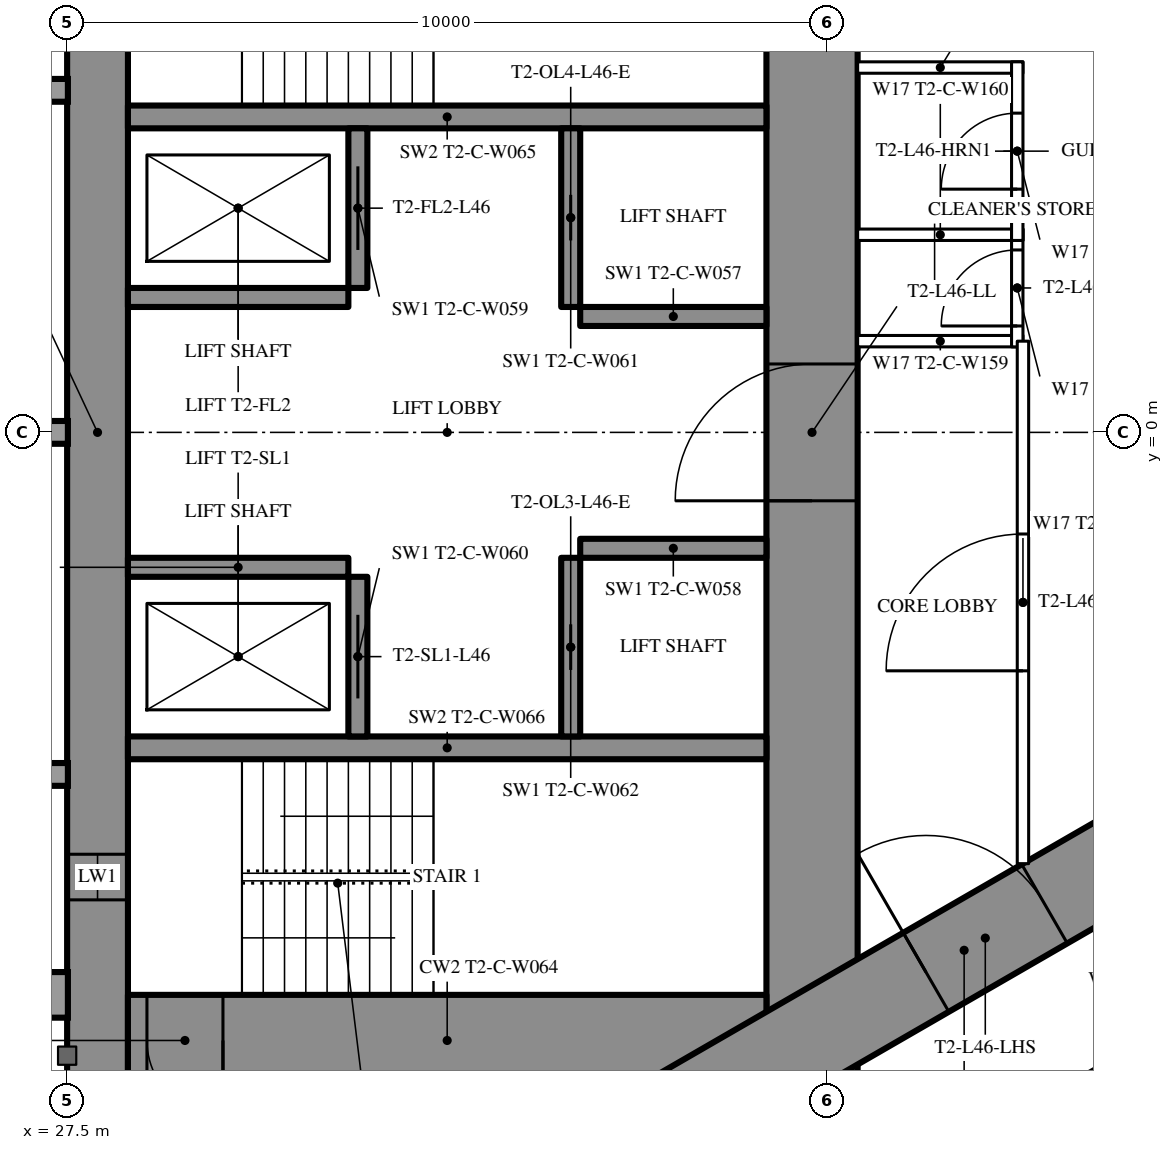
"""IFC4 building model, lengths in metres.
Left out: names, types, materials, properties, quantities, classifications, styles, units other than length and angle.
Written with IfcOpenShell. Run it as: python <this file> out.ifc"""

import sys

from ifc_helpers import new_model, si_unit, direction, frame, frame_2d, origin, place, context, subcontext, project, spatial, rectangle, extrude, element, fill, save


model = new_model("IFC4")
c1 = context("Model", 3, precision=1e-05, world=origin(), true_north=direction((0.0, 1.0)))
c2 = subcontext(c1, "Body", "Model", "MODEL_VIEW")
j1 = project(units=[si_unit("LENGTHUNIT", "METRE"), si_unit("PLANEANGLEUNIT", "RADIAN")], contexts=[c1])
p1 = place(None, origin())
s1 = spatial("IfcSite", under=j1, at=p1, CompositionType="ELEMENT")
p2 = place(p1, origin())
s2 = spatial("IfcBuilding", under=s1, at=p2, CompositionType="ELEMENT")
p3 = place(p2, frame((0.0, 0.0, 173.8)))
s3 = spatial("IfcBuildingStorey", under=s2, at=p3, CompositionType="ELEMENT", Elevation=173.8)
p4 = place(p3, frame((27.9, -8.6, 0.0), z_axis=(0.0, 0.0, 1.0), x_axis=(0.0, 1.0, 0.0)))
e1 = element("IfcWall", 1, at=p4, inside=s3, PredefinedType="SHEAR", context=c2, shape_type="SweptSolid", body=[
    extrude(rectangle(XDim=17.2, YDim=0.8, at=frame_2d((8.6, 0.0))), origin(), (0.0, 0.0, 1.0), 3.5),
])
p5 = place(p4, frame((2.45, 0.0, 0.6)))
e2 = element("IfcOpeningElement", 2, at=p5, cuts=e1, PredefinedType="OPENING", context=c2, shape_type="SweptSolid", body=[
    extrude(rectangle(XDim=0.6, YDim=2.1, at=frame_2d((0.3, 1.05))), frame((0.0, 0.41, 0.0), z_axis=(0.0, -1.0, 0.0), x_axis=(1.0, 0.0, 0.0)), (0.0, 0.0, 1.0), 0.82),
])
p6 = place(p4, frame((14.15, 0.0, 0.6)))
e3 = element("IfcOpeningElement", 3, at=p6, cuts=e1, PredefinedType="OPENING", context=c2, shape_type="SweptSolid", body=[
    extrude(rectangle(XDim=0.6, YDim=2.1, at=frame_2d((0.3, 1.05))), frame((0.0, 0.41, 0.0), z_axis=(0.0, -1.0, 0.0), x_axis=(1.0, 0.0, 0.0)), (0.0, 0.0, 1.0), 0.82),
])
p7 = place(p3, frame((37.3, -8.6, 0.0), z_axis=(0.0, 0.0, 1.0), x_axis=(0.0, 1.0, 0.0)))
e4 = element("IfcWall", 4, at=p7, inside=s3, PredefinedType="SHEAR", context=c2, shape_type="SweptSolid", body=[
    extrude(rectangle(XDim=17.2, YDim=1.2, at=frame_2d((8.6, 0.0))), origin(), (0.0, 0.0, 1.0), 3.5),
])
p8 = place(p7, frame((7.7, 0.0, 0.0)))
e5 = element("IfcOpeningElement", 5, at=p8, cuts=e4, PredefinedType="OPENING", context=c2, shape_type="SweptSolid", body=[
    extrude(rectangle(XDim=1.8, YDim=2.2, at=frame_2d((0.9, 1.1))), frame((0.0, 0.61, 0.0), z_axis=(0.0, -1.0, 0.0), x_axis=(1.0, 0.0, 0.0)), (0.0, 0.0, 1.0), 1.22),
])
p9 = place(p3, frame((28.3, -8.0, 0.0), z_axis=(0.0, 0.0, 1.0), x_axis=(1.0, 0.0, 0.0)))
e6 = element("IfcWall", 6, at=p9, inside=s3, PredefinedType="SHEAR", context=c2, shape_type="SweptSolid", body=[
    extrude(rectangle(XDim=8.4, YDim=1.2, at=frame_2d((4.2, 0.0))), origin(), (0.0, 0.0, 1.0), 3.5),
])
p10 = place(p9, frame((0.25, 0.0, 0.0)))
e7 = element("IfcOpeningElement", 7, at=p10, cuts=e6, PredefinedType="OPENING", context=c2, shape_type="SweptSolid", body=[
    extrude(rectangle(XDim=1.0, YDim=2.2, at=frame_2d((0.5, 1.1))), frame((0.0, 0.61, 0.0), z_axis=(0.0, -1.0, 0.0), x_axis=(1.0, 0.0, 0.0)), (0.0, 0.0, 1.0), 1.22),
])
for number, where, z_axis, x_axis in (
    (8, (28.3, -4.15, 0.0), (0.0, 0.0, 1.0), (1.0, 0.0, 0.0)),
    (9, (28.3, 4.15, 0.0), (0.0, 0.0, 1.0), (1.0, 0.0, 0.0)),
):
    element("IfcWall", number, at=place(p3, frame(where, z_axis=z_axis, x_axis=x_axis)), inside=s3, PredefinedType="SHEAR", context=c2, shape_type="SweptSolid", body=[
        extrude(rectangle(XDim=8.4, YDim=0.3, at=frame_2d((4.2, 0.0))), origin(), (0.0, 0.0, 1.0), 3.5),
    ])
p11 = place(p3, frame((31.325, -4.0, 0.0), z_axis=(0.0, 0.0, 1.0), x_axis=(0.0, 1.0, 0.0)))
e10 = element("IfcWall", 10, at=p11, inside=s3, PredefinedType="SHEAR", context=c2, shape_type="SweptSolid", body=[
    extrude(rectangle(XDim=2.1, YDim=0.25, at=frame_2d((1.05, 0.0))), origin(), (0.0, 0.0, 1.0), 3.5),
])
p12 = place(p11, frame((0.5, 0.0, 0.0)))
e11 = element("IfcOpeningElement", 11, at=p12, cuts=e10, PredefinedType="OPENING", context=c2, shape_type="SweptSolid", body=[
    extrude(rectangle(XDim=1.1, YDim=2.2, at=frame_2d((0.55, 1.1))), frame((0.0, 0.135, 0.0), z_axis=(0.0, -1.0, 0.0), x_axis=(1.0, 0.0, 0.0)), (0.0, 0.0, 1.0), 0.27),
])
p13 = place(p3, frame((34.125, -4.0, 0.0), z_axis=(0.0, 0.0, 1.0), x_axis=(0.0, 1.0, 0.0)))
e12 = element("IfcWall", 12, at=p13, inside=s3, PredefinedType="SHEAR", context=c2, shape_type="SweptSolid", body=[
    extrude(rectangle(XDim=2.35, YDim=0.25, at=frame_2d((1.175, 0.0))), origin(), (0.0, 0.0, 1.0), 3.5),
])
p14 = place(p13, frame((0.875, 0.0, 0.0)))
e13 = element("IfcOpeningElement", 13, at=p14, cuts=e12, PredefinedType="OPENING", context=c2, shape_type="SweptSolid", body=[
    extrude(rectangle(XDim=0.6, YDim=2.0, at=frame_2d((0.3, 1.0))), frame((0.0, 0.135, 0.0), z_axis=(0.0, -1.0, 0.0), x_axis=(1.0, 0.0, 0.0)), (0.0, 0.0, 1.0), 0.27),
])
p15 = place(p3, frame((28.3, -1.775, 0.0), z_axis=(0.0, 0.0, 1.0), x_axis=(1.0, 0.0, 0.0)))
e14 = element("IfcWall", 14, at=p15, inside=s3, PredefinedType="SHEAR", context=c2, shape_type="SweptSolid", body=[
    extrude(rectangle(XDim=2.9, YDim=0.25, at=frame_2d((1.45, 0.0))), origin(), (0.0, 0.0, 1.0), 3.5),
])
p16 = place(p3, frame((34.25, -1.525, 0.0), z_axis=(0.0, 0.0, 1.0), x_axis=(1.0, 0.0, 0.0)))
e15 = element("IfcWall", 15, at=p16, inside=s3, PredefinedType="SHEAR", context=c2, shape_type="SweptSolid", body=[
    extrude(rectangle(XDim=2.45, YDim=0.25, at=frame_2d((1.225, 0.0))), origin(), (0.0, 0.0, 1.0), 3.5),
])
p17 = place(p3, frame((31.325, 1.9, 0.0), z_axis=(0.0, 0.0, 1.0), x_axis=(0.0, 1.0, 0.0)))
e16 = element("IfcWall", 16, at=p17, inside=s3, PredefinedType="SHEAR", context=c2, shape_type="SweptSolid", body=[
    extrude(rectangle(XDim=2.1, YDim=0.25, at=frame_2d((1.05, 0.0))), origin(), (0.0, 0.0, 1.0), 3.5),
])
p18 = place(p17, frame((0.5, 0.0, 0.0)))
e17 = element("IfcOpeningElement", 17, at=p18, cuts=e16, PredefinedType="OPENING", context=c2, shape_type="SweptSolid", body=[
    extrude(rectangle(XDim=1.1, YDim=2.2, at=frame_2d((0.55, 1.1))), frame((0.0, 0.135, 0.0), z_axis=(0.0, -1.0, 0.0), x_axis=(1.0, 0.0, 0.0)), (0.0, 0.0, 1.0), 0.27),
])
p19 = place(p3, frame((34.125, 1.65, 0.0), z_axis=(0.0, 0.0, 1.0), x_axis=(0.0, 1.0, 0.0)))
e18 = element("IfcWall", 18, at=p19, inside=s3, PredefinedType="SHEAR", context=c2, shape_type="SweptSolid", body=[
    extrude(rectangle(XDim=2.35, YDim=0.25, at=frame_2d((1.175, 0.0))), origin(), (0.0, 0.0, 1.0), 3.5),
])
p20 = place(p19, frame((0.875, 0.0, 0.0)))
e19 = element("IfcOpeningElement", 19, at=p20, cuts=e18, PredefinedType="OPENING", context=c2, shape_type="SweptSolid", body=[
    extrude(rectangle(XDim=0.6, YDim=2.0, at=frame_2d((0.3, 1.0))), frame((0.0, 0.135, 0.0), z_axis=(0.0, -1.0, 0.0), x_axis=(1.0, 0.0, 0.0)), (0.0, 0.0, 1.0), 0.27),
])
p21 = place(p3, frame((28.3, 1.775, 0.0), z_axis=(0.0, 0.0, 1.0), x_axis=(1.0, 0.0, 0.0)))
e20 = element("IfcWall", 20, at=p21, inside=s3, PredefinedType="SHEAR", context=c2, shape_type="SweptSolid", body=[
    extrude(rectangle(XDim=2.9, YDim=0.25, at=frame_2d((1.45, 0.0))), origin(), (0.0, 0.0, 1.0), 3.5),
])
p22 = place(p3, frame((34.25, 1.525, 0.0), z_axis=(0.0, 0.0, 1.0), x_axis=(1.0, 0.0, 0.0)))
e21 = element("IfcWall", 21, at=p22, inside=s3, PredefinedType="SHEAR", context=c2, shape_type="SweptSolid", body=[
    extrude(rectangle(XDim=2.45, YDim=0.25, at=frame_2d((1.225, 0.0))), origin(), (0.0, 0.0, 1.0), 3.5),
])
p23 = place(p3, frame((27.2, -13.8, 0.0), z_axis=(0.0, 0.0, 1.0), x_axis=(0.866027159892, 0.499996958321, 0.0)))
e22 = element("IfcWall", 22, at=p23, inside=s3, PredefinedType="SHEAR", context=c2, shape_type="SweptSolid", body=[
    extrude(rectangle(XDim=27.947, YDim=1.2, at=frame_2d((13.973, 0.0))), origin(), (0.0, 0.0, 1.0), 3.5),
])
p24 = place(p23, frame((4.6, 0.0, 0.0)))
e23 = element("IfcOpeningElement", 23, at=p24, cuts=e22, PredefinedType="OPENING", context=c2, shape_type="SweptSolid", body=[
    extrude(rectangle(XDim=1.0, YDim=2.2, at=frame_2d((0.5, 1.1))), frame((0.0, 0.61, 0.0), z_axis=(0.0, -1.0, 0.0), x_axis=(1.0, 0.0, 0.0)), (0.0, 0.0, 1.0), 1.22),
])
p25 = place(p23, frame((13.395, 0.0, 0.0)))
e24 = element("IfcOpeningElement", 24, at=p25, cuts=e22, PredefinedType="OPENING", context=c2, shape_type="SweptSolid", body=[
    extrude(rectangle(XDim=1.8, YDim=2.2, at=frame_2d((0.9, 1.1))), frame((0.0, 0.61, 0.0), z_axis=(0.0, -1.0, 0.0), x_axis=(1.0, 0.0, 0.0)), (0.0, 0.0, 1.0), 1.22),
])
p26 = place(p3, frame((27.2, 13.8, 0.0), z_axis=(0.0, 0.0, 1.0), x_axis=(0.866024515034, -0.500001539357, 0.0)))
e25 = element("IfcWall", 25, at=p26, inside=s3, PredefinedType="SHEAR", context=c2, shape_type="SweptSolid", body=[
    extrude(rectangle(XDim=26.907, YDim=1.2, at=frame_2d((13.454, 0.0))), origin(), (0.0, 0.0, 1.0), 3.5),
])
p27 = place(p26, frame((4.6, 0.0, 0.0)))
e26 = element("IfcOpeningElement", 26, at=p27, cuts=e25, PredefinedType="OPENING", context=c2, shape_type="SweptSolid", body=[
    extrude(rectangle(XDim=1.0, YDim=2.2, at=frame_2d((0.5, 1.1))), frame((0.0, 0.61, 0.0), z_axis=(0.0, -1.0, 0.0), x_axis=(1.0, 0.0, 0.0)), (0.0, 0.0, 1.0), 1.22),
])
p28 = place(p26, frame((13.395, 0.0, 0.0)))
e27 = element("IfcOpeningElement", 27, at=p28, cuts=e25, PredefinedType="OPENING", context=c2, shape_type="SweptSolid", body=[
    extrude(rectangle(XDim=1.8, YDim=2.2, at=frame_2d((0.9, 1.1))), frame((0.0, 0.61, 0.0), z_axis=(0.0, -1.0, 0.0), x_axis=(1.0, 0.0, 0.0)), (0.0, 0.0, 1.0), 1.22),
])
p29 = place(p3, frame((27.959, -16.017, 0.0), z_axis=(0.0, 0.0, 1.0), x_axis=(0.866024151371, 0.500002169237, 0.0)))
e28 = element("IfcWall", 28, at=p29, inside=s3, PredefinedType="PARTITIONING", context=c2, shape_type="SweptSolid", body=[
    extrude(rectangle(XDim=32.034, YDim=0.2, at=frame_2d((16.017, 0.0))), origin(), (0.0, 0.0, 1.0), 3.25),
])
p30 = place(p29, frame((4.765, 0.0, 0.0)))
e29 = element("IfcOpeningElement", 29, at=p30, cuts=e28, PredefinedType="OPENING", context=c2, shape_type="SweptSolid", body=[
    extrude(rectangle(XDim=0.95, YDim=2.2, at=frame_2d((0.475, 1.1))), frame((0.0, 0.11, 0.0), z_axis=(0.0, -1.0, 0.0), x_axis=(1.0, 0.0, 0.0)), (0.0, 0.0, 1.0), 0.22),
])
p31 = place(p29, frame((9.215, 0.0, 0.0)))
e30 = element("IfcOpeningElement", 30, at=p31, cuts=e28, PredefinedType="OPENING", context=c2, shape_type="SweptSolid", body=[
    extrude(rectangle(XDim=1.0, YDim=2.2, at=frame_2d((0.5, 1.1))), frame((0.0, 0.11, 0.0), z_axis=(0.0, -1.0, 0.0), x_axis=(1.0, 0.0, 0.0)), (0.0, 0.0, 1.0), 0.22),
])
p32 = place(p29, frame((19.725, 0.0, 0.0)))
e31 = element("IfcOpeningElement", 31, at=p32, cuts=e28, PredefinedType="OPENING", context=c2, shape_type="SweptSolid", body=[
    extrude(rectangle(XDim=0.95, YDim=2.2, at=frame_2d((0.475, 1.1))), frame((0.0, 0.11, 0.0), z_axis=(0.0, -1.0, 0.0), x_axis=(1.0, 0.0, 0.0)), (0.0, 0.0, 1.0), 0.22),
])
p33 = place(p29, frame((26.125, 0.0, 0.0)))
e32 = element("IfcOpeningElement", 32, at=p33, cuts=e28, PredefinedType="OPENING", context=c2, shape_type="SweptSolid", body=[
    extrude(rectangle(XDim=0.95, YDim=2.2, at=frame_2d((0.475, 1.1))), frame((0.0, 0.11, 0.0), z_axis=(0.0, -1.0, 0.0), x_axis=(1.0, 0.0, 0.0)), (0.0, 0.0, 1.0), 0.22),
])
p34 = place(p29, frame((28.106, 0.0, 0.0)))
e33 = element("IfcOpeningElement", 33, at=p34, cuts=e28, PredefinedType="OPENING", context=c2, shape_type="SweptSolid", body=[
    extrude(rectangle(XDim=0.95, YDim=2.2, at=frame_2d((0.475, 1.1))), frame((0.0, 0.11, 0.0), z_axis=(0.0, -1.0, 0.0), x_axis=(1.0, 0.0, 0.0)), (0.0, 0.0, 1.0), 0.22),
])
for number, where, z_axis, x_axis in (
    (34, (37.9, 1.2, 0.0), (0.0, 0.0, 1.0), (1.0, 0.0, 0.0)),
    (35, (37.9, 2.6, 0.0), (0.0, 0.0, 1.0), (1.0, 0.0, 0.0)),
    (36, (37.9, 4.8, 0.0), (0.0, 0.0, 1.0), (1.0, 0.0, 0.0)),
):
    element("IfcWall", number, at=place(p3, frame(where, z_axis=z_axis, x_axis=x_axis)), inside=s3, PredefinedType="PARTITIONING", context=c2, shape_type="SweptSolid", body=[
        extrude(rectangle(XDim=2.175, YDim=0.15, at=frame_2d((1.087, 0.0))), origin(), (0.0, 0.0, 1.0), 3.25),
    ])
p35 = place(p3, frame((40.0, 1.125, 0.0), z_axis=(0.0, 0.0, 1.0), x_axis=(0.0, 1.0, 0.0)))
e37 = element("IfcWall", 37, at=p35, inside=s3, PredefinedType="PARTITIONING", context=c2, shape_type="SweptSolid", body=[
    extrude(rectangle(XDim=1.55, YDim=0.15, at=frame_2d((0.775, 0.0))), origin(), (0.0, 0.0, 1.0), 3.25),
])
p36 = place(p35, frame((0.275, 0.0, 0.0)))
e38 = element("IfcOpeningElement", 38, at=p36, cuts=e37, PredefinedType="OPENING", context=c2, shape_type="SweptSolid", body=[
    extrude(rectangle(XDim=1.0, YDim=2.2, at=frame_2d((0.5, 1.1))), frame((0.0, 0.085, 0.0), z_axis=(0.0, -1.0, 0.0), x_axis=(1.0, 0.0, 0.0)), (0.0, 0.0, 1.0), 0.17),
])
p37 = place(p3, frame((40.0, 2.525, 0.0), z_axis=(0.0, 0.0, 1.0), x_axis=(0.0, 1.0, 0.0)))
e39 = element("IfcWall", 39, at=p37, inside=s3, PredefinedType="PARTITIONING", context=c2, shape_type="SweptSolid", body=[
    extrude(rectangle(XDim=2.35, YDim=0.15, at=frame_2d((1.175, 0.0))), origin(), (0.0, 0.0, 1.0), 3.25),
])
p38 = place(p37, frame((0.675, 0.0, 0.0)))
e40 = element("IfcOpeningElement", 40, at=p38, cuts=e39, PredefinedType="OPENING", context=c2, shape_type="SweptSolid", body=[
    extrude(rectangle(XDim=1.0, YDim=2.2, at=frame_2d((0.5, 1.1))), frame((0.0, 0.085, 0.0), z_axis=(0.0, -1.0, 0.0), x_axis=(1.0, 0.0, 0.0)), (0.0, 0.0, 1.0), 0.17),
])
p39 = place(p3, frame((40.075, -5.674, 0.0), z_axis=(0.0, 0.0, 1.0), x_axis=(0.0, 1.0, 0.0)))
e41 = element("IfcWall", 41, at=p39, inside=s3, PredefinedType="PARTITIONING", context=c2, shape_type="SweptSolid", body=[
    extrude(rectangle(XDim=6.874, YDim=0.15, at=frame_2d((3.437, 0.0))), origin(), (0.0, 0.0, 1.0), 3.25),
])
p40 = place(p39, frame((2.537, 0.0, 0.0)))
e42 = element("IfcOpeningElement", 42, at=p40, cuts=e41, PredefinedType="OPENING", context=c2, shape_type="SweptSolid", body=[
    extrude(rectangle(XDim=1.8, YDim=2.2, at=frame_2d((0.9, 1.1))), frame((0.0, 0.085, 0.0), z_axis=(0.0, -1.0, 0.0), x_axis=(1.0, 0.0, 0.0)), (0.0, 0.0, 1.0), 0.17),
])
p41 = place(p36, origin())
e43 = element("IfcDoor", 43, at=p41, inside=s3, OperationType="SINGLE_SWING_LEFT", PredefinedType="DOOR", context=c2, shape_type="SweptSolid", body=[
    extrude(rectangle(XDim=1.0, YDim=2.2, at=frame_2d((0.5, 1.1))), frame((0.0, 0.025, 0.0), z_axis=(0.0, -1.0, 0.0), x_axis=(1.0, 0.0, 0.0)), (0.0, 0.0, 1.0), 0.05),
])
fill(e38, e43)
p42 = place(p38, origin())
e44 = element("IfcDoor", 44, at=p42, inside=s3, OperationType="SINGLE_SWING_LEFT", PredefinedType="DOOR", context=c2, shape_type="SweptSolid", body=[
    extrude(rectangle(XDim=1.0, YDim=2.2, at=frame_2d((0.5, 1.1))), frame((0.0, 0.025, 0.0), z_axis=(0.0, -1.0, 0.0), x_axis=(1.0, 0.0, 0.0)), (0.0, 0.0, 1.0), 0.05),
])
fill(e40, e44)
p43 = place(p40, origin())
e45 = element("IfcDoor", 45, at=p43, inside=s3, OperationType="DOUBLE_DOOR_SINGLE_SWING", PredefinedType="DOOR", context=c2, shape_type="SweptSolid", body=[
    extrude(rectangle(XDim=1.8, YDim=2.2, at=frame_2d((0.9, 1.1))), frame((0.0, 0.025, 0.0), z_axis=(0.0, -1.0, 0.0), x_axis=(1.0, 0.0, 0.0)), (0.0, 0.0, 1.0), 0.05),
])
fill(e42, e45)
p44 = place(p25, origin())
e46 = element("IfcDoor", 46, at=p44, inside=s3, OperationType="DOUBLE_DOOR_SINGLE_SWING", PredefinedType="DOOR", context=c2, shape_type="SweptSolid", body=[
    extrude(rectangle(XDim=1.8, YDim=2.2, at=frame_2d((0.9, 1.1))), frame((0.0, 0.025, 0.0), z_axis=(0.0, -1.0, 0.0), x_axis=(1.0, 0.0, 0.0)), (0.0, 0.0, 1.0), 0.05),
])
fill(e24, e46)
p45 = place(p8, origin())
e47 = element("IfcDoor", 47, at=p45, inside=s3, OperationType="DOUBLE_DOOR_SINGLE_SWING", PredefinedType="DOOR", context=c2, shape_type="SweptSolid", body=[
    extrude(rectangle(XDim=1.8, YDim=2.2, at=frame_2d((0.9, 1.1))), frame((0.0, 0.025, 0.0), z_axis=(0.0, -1.0, 0.0), x_axis=(1.0, 0.0, 0.0)), (0.0, 0.0, 1.0), 0.05),
])
fill(e5, e47)
p46 = place(p10, origin())
e48 = element("IfcDoor", 48, at=p46, inside=s3, OperationType="SINGLE_SWING_RIGHT", PredefinedType="DOOR", context=c2, shape_type="SweptSolid", body=[
    extrude(rectangle(XDim=1.0, YDim=2.2, at=frame_2d((0.5, 1.1))), frame((0.0, 0.025, 0.0), z_axis=(0.0, -1.0, 0.0), x_axis=(1.0, 0.0, 0.0)), (0.0, 0.0, 1.0), 0.05),
])
fill(e7, e48)
p47 = place(p12, origin())
e49 = element("IfcDoor", 49, at=p47, inside=s3, OperationType="SLIDING_TO_LEFT", PredefinedType="USERDEFINED", context=c2, shape_type="SweptSolid", body=[
    extrude(rectangle(XDim=1.1, YDim=2.2, at=frame_2d((0.55, 1.1))), frame((0.0, 0.025, 0.0), z_axis=(0.0, -1.0, 0.0), x_axis=(1.0, 0.0, 0.0)), (0.0, 0.0, 1.0), 0.05),
])
fill(e11, e49)
p48 = place(p18, origin())
e50 = element("IfcDoor", 50, at=p48, inside=s3, OperationType="SLIDING_TO_LEFT", PredefinedType="USERDEFINED", context=c2, shape_type="SweptSolid", body=[
    extrude(rectangle(XDim=1.1, YDim=2.2, at=frame_2d((0.55, 1.1))), frame((0.0, 0.025, 0.0), z_axis=(0.0, -1.0, 0.0), x_axis=(1.0, 0.0, 0.0)), (0.0, 0.0, 1.0), 0.05),
])
fill(e17, e50)
p49 = place(p14, origin())
e51 = element("IfcDoor", 51, at=p49, inside=s3, OperationType="SLIDING_TO_LEFT", PredefinedType="DOOR", context=c2, shape_type="SweptSolid", body=[
    extrude(rectangle(XDim=0.6, YDim=2.0, at=frame_2d((0.3, 1.0))), frame((0.0, 0.025, 0.0), z_axis=(0.0, -1.0, 0.0), x_axis=(1.0, 0.0, 0.0)), (0.0, 0.0, 1.0), 0.05),
])
fill(e13, e51)
p50 = place(p20, origin())
e52 = element("IfcDoor", 52, at=p50, inside=s3, OperationType="SLIDING_TO_LEFT", PredefinedType="DOOR", context=c2, shape_type="SweptSolid", body=[
    extrude(rectangle(XDim=0.6, YDim=2.0, at=frame_2d((0.3, 1.0))), frame((0.0, 0.025, 0.0), z_axis=(0.0, -1.0, 0.0), x_axis=(1.0, 0.0, 0.0)), (0.0, 0.0, 1.0), 0.05),
])
fill(e19, e52)
p51 = place(p5, origin())
e53 = element("IfcWindow", 53, at=p51, inside=s3, PartitioningType="SINGLE_PANEL", PredefinedType="WINDOW", context=c2, shape_type="SweptSolid", body=[
    extrude(rectangle(XDim=0.6, YDim=2.1, at=frame_2d((0.3, 1.05))), frame((0.0, 0.03, 0.0), z_axis=(0.0, -1.0, 0.0), x_axis=(1.0, 0.0, 0.0)), (0.0, 0.0, 1.0), 0.06),
])
fill(e2, e53)
save(model, sys.argv[1])
